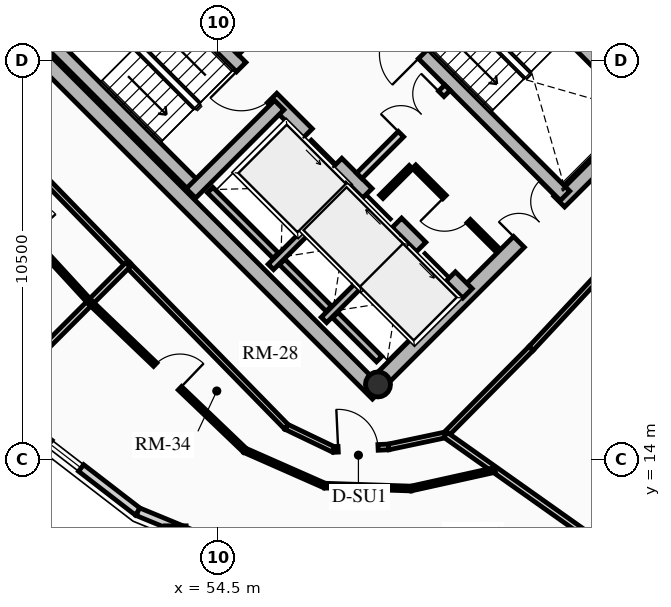
"""IFC4 building model, lengths in metres.
Left out: names, types, materials, properties, quantities, classifications, styles, units other than length and angle.
Written with IfcOpenShell. Run it as: python <this file> out.ifc"""

import sys

from ifc_helpers import new_model, si_unit, direction, frame, frame_2d, origin, origin_2d, place, context, subcontext, project, spatial, rectangle, circle, hollow_circle, extrude, source, transform, mapped, element, fill, save


model = new_model("IFC4")
c1 = context("Model", 3, precision=1e-05, world=origin(), true_north=direction((0.0, 1.0)))
c2 = subcontext(c1, "Body", "Model", "MODEL_VIEW")
j1 = project(units=[si_unit("LENGTHUNIT", "METRE"), si_unit("PLANEANGLEUNIT", "RADIAN")], contexts=[c1])
p1 = place(None, origin())
s1 = spatial("IfcSite", under=j1, at=p1, CompositionType="ELEMENT")
p2 = place(p1, origin())
s2 = spatial("IfcBuilding", under=s1, at=p2, CompositionType="ELEMENT")
p3 = place(p2, frame((0.0, 0.0, 222.85)))
s3 = spatial("IfcBuildingStorey", under=s2, at=p3, CompositionType="ELEMENT", Elevation=222.85)
for number, where, z_axis, x_axis in (
    (1, (58.702, 15.732, 0.0), (0.0, 0.0, 1.0), (-0.707, 0.707, 0.0)),
    (2, (66.268, 23.298, 0.0), (0.0, 0.0, 1.0), (-0.707, 0.707, 0.0)),
):
    element("IfcWall", number, at=place(p3, frame(where, z_axis=z_axis, x_axis=x_axis)), inside=s3, PredefinedType="SHEAR", context=c2, shape_type="SweptSolid", body=[
        extrude(rectangle(XDim=14.1, YDim=0.4, at=frame_2d((7.05, 0.0))), origin(), (0.0, 0.0, 1.0), 3.2),
    ])
p4 = place(p3, frame((58.561, 15.873, 0.0), z_axis=(0.0, 0.0, 1.0), x_axis=(0.707106781187, 0.707106781187, 0.0)))
e3 = element("IfcWall", 3, at=p4, inside=s3, PredefinedType="SHEAR", context=c2, shape_type="SweptSolid", body=[
    extrude(rectangle(XDim=10.7, YDim=0.4, at=frame_2d((5.35, 0.0))), origin(), (0.0, 0.0, 1.0), 3.2),
])
m1 = source(origin(), c2, "Body", "SweptSolid", [
    extrude(rectangle(XDim=1.5, YDim=2.02, at=frame_2d((0.75, 1.01))), frame((0.0, 0.21, 0.0), z_axis=(0.0, -1.0, 0.0), x_axis=(1.0, 0.0, 0.0)), (0.0, 0.0, 1.0), 0.42),
])
p5 = place(p4, frame((5.45, 0.0, 0.0)))
e4 = element("IfcOpeningElement", 4, at=p5, cuts=e3, PredefinedType="OPENING", context=c2, shape_type="MappedRepresentation", body=[
    mapped(m1, transform((0.0, 0.0, 0.0), x_axis=(1.0, 0.0, 0.0), y_axis=(0.0, 1.0, 0.0), z_axis=(0.0, 0.0, 1.0), scale=1.0)),
])
p6 = place(p3, frame((61.06, 18.373, 0.0), z_axis=(0.0, 0.0, 1.0), x_axis=(-0.707106781187, 0.707106781187, 0.0)))
e5 = element("IfcWall", 5, at=p6, inside=s3, PredefinedType="SHEAR", context=c2, shape_type="SweptSolid", body=[
    extrude(rectangle(XDim=13.7, YDim=0.35, at=frame_2d((6.85, 0.0))), origin(), (0.0, 0.0, 1.0), 3.2),
])
m2 = source(origin(), c2, "Body", "SweptSolid", [
    extrude(rectangle(XDim=1.1, YDim=2.015, at=frame_2d((0.55, 1.007))), frame((0.0, 0.185, 0.0), z_axis=(0.0, -1.0, 0.0), x_axis=(1.0, 0.0, 0.0)), (0.0, 0.0, 1.0), 0.37),
])
p7 = place(p6, frame((4.85, 0.0, 0.0)))
e6 = element("IfcOpeningElement", 6, at=p7, cuts=e5, PredefinedType="OPENING", context=c2, shape_type="MappedRepresentation", body=[
    mapped(m2, transform((0.0, 0.0, 0.0), x_axis=(1.0, 0.0, 0.0), y_axis=(0.0, 1.0, 0.0), z_axis=(0.0, 0.0, 1.0), scale=1.0)),
])
p8 = place(p6, frame((0.625, 0.0, 0.0)))
e7 = element("IfcOpeningElement", 7, at=p8, cuts=e5, PredefinedType="OPENING", context=c2, shape_type="MappedRepresentation", body=[
    mapped(m2, transform((0.0, 0.0, 0.0), x_axis=(1.0, 0.0, 0.0), y_axis=(0.0, 1.0, 0.0), z_axis=(0.0, 0.0, 1.0), scale=1.0)),
])
p9 = place(p6, frame((2.625, 0.0, 0.0)))
e8 = element("IfcOpeningElement", 8, at=p9, cuts=e5, PredefinedType="OPENING", context=c2, shape_type="MappedRepresentation", body=[
    mapped(m2, transform((0.0, 0.0, 0.0), x_axis=(1.0, 0.0, 0.0), y_axis=(0.0, 1.0, 0.0), z_axis=(0.0, 0.0, 1.0), scale=1.0)),
])
m3 = source(origin(), c2, "Body", "SweptSolid", [
    extrude(rectangle(XDim=1.15, YDim=2.02, at=frame_2d((0.575, 1.01))), frame((0.0, 0.185, 0.0), z_axis=(0.0, -1.0, 0.0), x_axis=(1.0, 0.0, 0.0)), (0.0, 0.0, 1.0), 0.37),
])
p10 = place(p6, frame((7.27, 0.0, 0.0)))
e9 = element("IfcOpeningElement", 9, at=p10, cuts=e5, PredefinedType="OPENING", context=c2, shape_type="MappedRepresentation", body=[
    mapped(m3, transform((0.0, 0.0, 0.0), x_axis=(1.0, 0.0, 0.0), y_axis=(0.0, 1.0, 0.0), z_axis=(0.0, 0.0, 1.0), scale=1.0)),
])
p11 = place(p3, frame((63.627, 20.94, 0.0), z_axis=(0.0, 0.0, 1.0), x_axis=(-0.707119496762, 0.707094065383, 0.0)))
e10 = element("IfcWall", 10, at=p11, inside=s3, PredefinedType="SHEAR", context=c2, shape_type="SweptSolid", body=[
    extrude(rectangle(XDim=9.6, YDim=0.35, at=frame_2d((4.8, 0.0))), origin(), (0.0, 0.0, 1.0), 3.2),
])
p12 = place(p11, frame((5.28, 0.0, 0.0)))
e11 = element("IfcOpeningElement", 11, at=p12, cuts=e10, PredefinedType="OPENING", context=c2, shape_type="MappedRepresentation", body=[
    mapped(m3, transform((0.0, 0.0, 0.0), x_axis=(1.0, 0.0, 0.0), y_axis=(0.0, 1.0, 0.0), z_axis=(0.0, 0.0, 1.0), scale=1.0)),
])
p13 = place(p3, frame((53.922, 21.141, 0.0), z_axis=(0.0, 0.0, 1.0), x_axis=(-0.707106781187, 0.707106781187, 0.0)))
e12 = element("IfcWall", 12, at=p13, inside=s3, PredefinedType="SHEAR", context=c2, shape_type="SweptSolid", body=[
    extrude(rectangle(XDim=6.695, YDim=0.35, at=frame_2d((3.348, 0.0))), origin(), (0.0, 0.0, 1.0), 3.2),
])
p14 = place(p3, frame((53.784, 21.003, 0.0), z_axis=(0.0, 0.0, 1.0), x_axis=(0.707106781187, 0.707106781187, 0.0)))
e13 = element("IfcWall", 13, at=p14, inside=s3, PredefinedType="SHEAR", context=c2, shape_type="SweptSolid", body=[
    extrude(rectangle(XDim=3.285, YDim=0.35, at=frame_2d((1.643, 0.0))), origin(), (0.0, 0.0, 1.0), 3.2),
])
p15 = place(p3, frame((65.812, 23.125, 0.0), z_axis=(0.0, 0.0, 1.0), x_axis=(-0.707106781187, 0.707106781187, 0.0)))
e14 = element("IfcWall", 14, at=p15, inside=s3, PredefinedType="SHEAR", context=c2, shape_type="SweptSolid", body=[
    extrude(rectangle(XDim=6.695, YDim=0.35, at=frame_2d((3.348, 0.0))), origin(), (0.0, 0.0, 1.0), 3.2),
])
p16 = place(p3, frame((58.706, 15.976, 0.0), z_axis=(0.0, 0.0, 1.0), x_axis=(0.707106781187, 0.707106781187, 0.0)))
e15 = element("IfcColumn", 15, at=p16, inside=s3, PredefinedType="COLUMN", context=c2, shape_type="SweptSolid", body=[
    extrude(hollow_circle(Radius=0.33, WallThickness=0.025, at=origin_2d()), origin(), (0.0, 0.0, 1.0), 3.2),
])
p17 = place(p3, frame((64.827, 11.854, 0.0), z_axis=(0.0, 0.0, 1.0), x_axis=(1.0, 0.0, 0.0)))
e16 = element("IfcColumn", 16, at=p17, inside=s3, PredefinedType="USERDEFINED", context=c2, shape_type="SweptSolid", body=[
    extrude(circle(Radius=0.55, at=origin_2d()), origin(), (0.0, 0.0, 1.0), 3.2),
])
p18 = place(p3, frame((52.387, 12.626, 0.0), z_axis=(0.0, 0.0, 1.0), x_axis=(-0.791998462147, 0.610523083886, 0.0)))
e17 = element("IfcWall", 17, at=p18, inside=s3, PredefinedType="SOLIDWALL", context=c2, shape_type="SweptSolid", body=[
    extrude(rectangle(XDim=4.82, YDim=0.22, at=frame_2d((2.41, 0.0))), origin(), (0.0, 0.0, 1.0), 2.612),
])
m4 = source(origin(), c2, "Body", "SweptSolid", [
    extrude(rectangle(XDim=1.05, YDim=1.3, at=frame_2d((0.525, 0.65))), frame((0.0, 0.12, 0.0), z_axis=(0.0, -1.0, 0.0), x_axis=(1.0, 0.0, 0.0)), (0.0, 0.0, 1.0), 0.24),
])
p19 = place(p18, frame((1.885, 0.0, 0.65)))
e18 = element("IfcOpeningElement", 18, at=p19, cuts=e17, PredefinedType="OPENING", context=c2, shape_type="MappedRepresentation", body=[
    mapped(m4, transform((0.0, 0.0, 0.0), x_axis=(1.0, 0.0, 0.0), y_axis=(0.0, 1.0, 0.0), z_axis=(0.0, 0.0, 1.0), scale=1.0)),
])
p20 = place(p3, frame((56.705, 10.845, 0.0), z_axis=(0.0, 0.0, 1.0), x_axis=(-0.924447353237, 0.381309704956, 0.0)))
e19 = element("IfcWall", 19, at=p20, inside=s3, PredefinedType="SOLIDWALL", context=c2, shape_type="SweptSolid", body=[
    extrude(rectangle(XDim=4.671, YDim=0.22, at=frame_2d((2.335, 0.0))), origin(), (0.0, 0.0, 1.0), 2.612),
])
p21 = place(p3, frame((55.888, 19.069, 0.0), z_axis=(0.0, 0.0, 1.0), x_axis=(0.707106781187, 0.707106781187, 0.0)))
e20 = element("IfcWall", 20, at=p21, inside=s3, PredefinedType="SHEAR", context=c2, shape_type="SweptSolid", body=[
    extrude(rectangle(XDim=2.97, YDim=0.2, at=frame_2d((1.485, 0.0))), origin(), (0.0, 0.0, 1.0), 3.2),
])
p22 = place(p3, frame((56.015, 19.366, 0.0), z_axis=(0.0, 0.0, 1.0), x_axis=(-0.707106781187, 0.707106781187, 0.0)))
e21 = element("IfcWall", 21, at=p22, inside=s3, PredefinedType="SHEAR", context=c2, shape_type="SweptSolid", body=[
    extrude(rectangle(XDim=2.44, YDim=0.2, at=frame_2d((1.22, 0.0))), origin(), (0.0, 0.0, 1.0), 3.2),
])
p23 = place(p3, frame((57.284, 17.673, 0.0), z_axis=(0.0, 0.0, 1.0), x_axis=(0.707147878904, 0.70706568108, 0.0)))
e22 = element("IfcWall", 22, at=p23, inside=s3, PredefinedType="SHEAR", context=c2, shape_type="SweptSolid", body=[
    extrude(rectangle(XDim=2.97, YDim=0.2, at=frame_2d((1.485, 0.0))), origin(), (0.0, 0.0, 1.0), 3.2),
])
p24 = place(p3, frame((57.412, 17.97, 0.0), z_axis=(0.0, 0.0, 1.0), x_axis=(-0.707106781187, 0.707106781187, 0.0)))
e23 = element("IfcWall", 23, at=p24, inside=s3, PredefinedType="SHEAR", context=c2, shape_type="SweptSolid", body=[
    extrude(rectangle(XDim=1.735, YDim=0.2, at=frame_2d((0.867, 0.0))), origin(), (0.0, 0.0, 1.0), 3.2),
])
p25 = place(p3, frame((58.737, 16.644, 0.0), z_axis=(0.0, 0.0, 1.0), x_axis=(-0.707032117043, 0.707181437447, 0.0)))
e24 = element("IfcWall", 24, at=p25, inside=s3, PredefinedType="SHEAR", context=c2, shape_type="SweptSolid", body=[
    extrude(rectangle(XDim=1.635, YDim=0.2, at=frame_2d((0.817, 0.0))), origin(), (0.0, 0.0, 1.0), 3.2),
])
p26 = place(p3, frame((58.214, 21.467, 0.0), z_axis=(0.0, 0.0, 1.0), x_axis=(0.707106781187, 0.707106781187, 0.0)))
e25 = element("IfcWall", 25, at=p26, inside=s3, PredefinedType="PARTITIONING", context=c2, shape_type="SweptSolid", body=[
    extrude(rectangle(XDim=3.28, YDim=0.2, at=frame_2d((1.64, 0.0))), origin(), (0.0, 0.0, 1.0), 2.975),
])
m5 = source(origin(), c2, "Body", "SweptSolid", [
    extrude(rectangle(XDim=1.5, YDim=2.02, at=frame_2d((0.75, 1.01))), frame((0.0, 0.11, 0.0), z_axis=(0.0, -1.0, 0.0), x_axis=(1.0, 0.0, 0.0)), (0.0, 0.0, 1.0), 0.22),
])
p27 = place(p26, frame((1.55, 0.0, 0.0)))
e26 = element("IfcOpeningElement", 26, at=p27, cuts=e25, PredefinedType="OPENING", context=c2, shape_type="MappedRepresentation", body=[
    mapped(m5, transform((0.0, 0.0, 0.0), x_axis=(1.0, 0.0, 0.0), y_axis=(0.0, 1.0, 0.0), z_axis=(0.0, 0.0, 1.0), scale=1.0)),
])
p28 = place(p3, frame((54.961, 24.719, 0.0), z_axis=(0.0, 0.0, 1.0), x_axis=(0.707106781187, 0.707106781187, 0.0)))
e27 = element("IfcWall", 27, at=p28, inside=s3, PredefinedType="PARTITIONING", context=c2, shape_type="SweptSolid", body=[
    extrude(rectangle(XDim=3.28, YDim=0.2, at=frame_2d((1.64, 0.0))), origin(), (0.0, 0.0, 1.0), 2.975),
])
m6 = source(origin(), c2, "Body", "SweptSolid", [
    extrude(rectangle(XDim=0.9, YDim=2.005, at=frame_2d((0.45, 1.002))), frame((0.0, 0.11, 0.0), z_axis=(0.0, -1.0, 0.0), x_axis=(1.0, 0.0, 0.0)), (0.0, 0.0, 1.0), 0.22),
])
p29 = place(p28, frame((0.16, 0.0, 0.0)))
e28 = element("IfcOpeningElement", 28, at=p29, cuts=e27, PredefinedType="OPENING", context=c2, shape_type="MappedRepresentation", body=[
    mapped(m6, transform((0.0, 0.0, 0.0), x_axis=(1.0, 0.0, 0.0), y_axis=(0.0, 1.0, 0.0), z_axis=(0.0, 0.0, 1.0), scale=1.0)),
])
p30 = place(p3, frame((61.835, 19.529, 0.0), z_axis=(0.0, 0.0, 1.0), x_axis=(-0.707146413884, 0.707067146267, 0.0)))
e29 = element("IfcWall", 29, at=p30, inside=s3, PredefinedType="PARTITIONING", context=c2, shape_type="SweptSolid", body=[
    extrude(rectangle(XDim=3.08, YDim=0.125, at=frame_2d((1.54, 0.0))), origin(), (0.0, 0.0, 1.0), 2.975),
])
m7 = source(origin(), c2, "Body", "SweptSolid", [
    extrude(rectangle(XDim=0.9, YDim=2.005, at=frame_2d((0.45, 1.002))), frame((0.0, 0.073, 0.0), z_axis=(0.0, -1.0, 0.0), x_axis=(1.0, 0.0, 0.0)), (0.0, 0.0, 1.0), 0.145),
])
p31 = place(p30, frame((1.05, 0.0, 0.0)))
e30 = element("IfcOpeningElement", 30, at=p31, cuts=e29, PredefinedType="OPENING", context=c2, shape_type="MappedRepresentation", body=[
    mapped(m7, transform((0.0, 0.0, 0.0), x_axis=(1.0, 0.0, 0.0), y_axis=(0.0, 1.0, 0.0), z_axis=(0.0, 0.0, 1.0), scale=1.0)),
])
p32 = place(p3, frame((58.794, 20.915, 0.0), z_axis=(0.0, 0.0, 1.0), x_axis=(0.707106781187, 0.707106781187, 0.0)))
e31 = element("IfcWall", 31, at=p32, inside=s3, PredefinedType="PARTITIONING", context=c2, shape_type="SweptSolid", body=[
    extrude(rectangle(XDim=1.1, YDim=0.125, at=frame_2d((0.55, 0.0))), origin(), (0.0, 0.0, 1.0), 2.975),
])
p33 = place(p3, frame((48.052, 23.323, 0.0), z_axis=(0.0, 0.0, 1.0), x_axis=(0.696573981306, -0.717484974454, 0.0)))
e32 = element("IfcWall", 32, at=p33, inside=s3, PredefinedType="PARTITIONING", context=c2, shape_type="SweptSolid", body=[
    extrude(rectangle(XDim=5.849, YDim=0.15, at=frame_2d((2.925, 0.0))), origin(), (0.0, 0.0, 1.0), 2.975),
])
p34 = place(p3, frame((52.126, 19.126, 0.0), z_axis=(0.0, 0.0, 1.0), x_axis=(0.698979087027, -0.715142108884, 0.0)))
e33 = element("IfcWall", 33, at=p34, inside=s3, PredefinedType="PARTITIONING", context=c2, shape_type="SweptSolid", body=[
    extrude(rectangle(XDim=5.966, YDim=0.15, at=frame_2d((2.983, 0.0))), origin(), (0.0, 0.0, 1.0), 2.612),
])
p35 = place(p3, frame((56.296, 14.859, 0.0), z_axis=(0.0, 0.0, 1.0), x_axis=(0.90178292445, -0.432189260823, 0.0)))
e34 = element("IfcWall", 34, at=p35, inside=s3, PredefinedType="PARTITIONING", context=c2, shape_type="SweptSolid", body=[
    extrude(rectangle(XDim=1.377, YDim=0.15, at=frame_2d((0.688, 0.0))), origin(), (0.0, 0.0, 1.0), 2.545),
])
p36 = place(p3, frame((57.538, 14.264, 0.0), z_axis=(0.0, 0.0, 1.0), x_axis=(0.99892990172, 0.046249880546, 0.0)))
e35 = element("IfcWall", 35, at=p36, inside=s3, PredefinedType="PARTITIONING", context=c2, shape_type="SweptSolid", body=[
    extrude(rectangle(XDim=1.446, YDim=0.15, at=frame_2d((0.723, 0.0))), origin(), (0.0, 0.0, 1.0), 2.612),
])
m8 = source(origin(), c2, "Body", "SweptSolid", [
    extrude(rectangle(XDim=1.05, YDim=2.015, at=frame_2d((0.525, 1.007))), frame((0.0, 0.085, 0.0), z_axis=(0.0, -1.0, 0.0), x_axis=(1.0, 0.0, 0.0)), (0.0, 0.0, 1.0), 0.17),
])
p37 = place(p36, frame((0.12, 0.0, 0.0)))
e36 = element("IfcOpeningElement", 36, at=p37, cuts=e35, PredefinedType="OPENING", context=c2, shape_type="MappedRepresentation", body=[
    mapped(m8, transform((0.0, 0.0, 0.0), x_axis=(1.0, 0.0, 0.0), y_axis=(0.0, 1.0, 0.0), z_axis=(0.0, 0.0, 1.0), scale=1.0)),
])
p38 = place(p3, frame((58.983, 14.331, 0.0), z_axis=(0.0, 0.0, 1.0), x_axis=(0.978328007546, 0.207061125397, 0.0)))
e37 = element("IfcWall", 37, at=p38, inside=s3, PredefinedType="PARTITIONING", context=c2, shape_type="SweptSolid", body=[
    extrude(rectangle(XDim=1.534, YDim=0.15, at=frame_2d((0.767, 0.0))), origin(), (0.0, 0.0, 1.0), 2.545),
])
p39 = place(p3, frame((60.484, 14.648, 0.0), z_axis=(0.0, 0.0, 1.0), x_axis=(0.703398221944, 0.710795991383, 0.0)))
e38 = element("IfcWall", 38, at=p39, inside=s3, PredefinedType="PARTITIONING", context=c2, shape_type="SweptSolid", body=[
    extrude(rectangle(XDim=3.201, YDim=0.15, at=frame_2d((1.601, 0.0))), origin(), (0.0, 0.0, 1.0), 2.612),
])
p40 = place(p3, frame((62.736, 16.924, 0.0), z_axis=(0.0, 0.0, 1.0), x_axis=(0.681946700833, 0.731401871219, 0.0)))
e39 = element("IfcWall", 39, at=p40, inside=s3, PredefinedType="PARTITIONING", context=c2, shape_type="SweptSolid", body=[
    extrude(rectangle(XDim=6.393, YDim=0.15, at=frame_2d((3.196, 0.0))), origin(), (0.0, 0.0, 1.0), 2.545),
])
p41 = place(p3, frame((52.126, 19.126, 0.0), z_axis=(0.0, 0.0, 1.0), x_axis=(-0.707106781187, -0.707106781187, 0.0)))
e40 = element("IfcWall", 40, at=p41, inside=s3, PredefinedType="PARTITIONING", context=c2, shape_type="SweptSolid", body=[
    extrude(rectangle(XDim=5.01, YDim=0.16, at=frame_2d((2.505, 0.0))), origin(), (0.0, 0.0, 1.0), 2.612),
])
p42 = place(p3, frame((60.484, 14.648, 0.0), z_axis=(0.0, 0.0, 1.0), x_axis=(0.81605983932, -0.577967420058, 0.0)))
e41 = element("IfcWall", 41, at=p42, inside=s3, PredefinedType="PARTITIONING", context=c2, shape_type="SweptSolid", body=[
    extrude(rectangle(XDim=5.699, YDim=0.16, at=frame_2d((2.85, 0.0))), origin(), (0.0, 0.0, 1.0), 2.612),
])
p43 = place(p3, frame((47.377, 22.223, 0.0), z_axis=(0.0, 0.0, 1.0), x_axis=(0.676554417653, -0.736392639802, 0.0)))
e42 = element("IfcWall", 42, at=p43, inside=s3, PredefinedType="PARTITIONING", context=c2, shape_type="SweptSolid", body=[
    extrude(rectangle(XDim=5.553, YDim=0.125, at=frame_2d((2.776, 0.0))), origin(), (0.0, 0.0, 1.0), 2.975),
])
p44 = place(p43, frame((2.326, 0.0, 0.0)))
e43 = element("IfcOpeningElement", 43, at=p44, cuts=e42, PredefinedType="OPENING", context=c2, shape_type="MappedRepresentation", body=[
    mapped(m7, transform((0.0, 0.0, 0.0), x_axis=(1.0, 0.0, 0.0), y_axis=(0.0, 1.0, 0.0), z_axis=(0.0, 0.0, 1.0), scale=1.0)),
])
p45 = place(p3, frame((51.134, 18.134, 0.0), z_axis=(0.0, 0.0, 1.0), x_axis=(0.722450775654, -0.691422357721, 0.0)))
e44 = element("IfcWall", 44, at=p45, inside=s3, PredefinedType="PARTITIONING", context=c2, shape_type="SweptSolid", body=[
    extrude(rectangle(XDim=5.634, YDim=0.125, at=frame_2d((2.817, 0.0))), origin(), (0.0, 0.0, 1.0), 2.612),
])
p46 = place(p45, frame((2.367, 0.0, 0.0)))
e45 = element("IfcOpeningElement", 45, at=p46, cuts=e44, PredefinedType="OPENING", context=c2, shape_type="MappedRepresentation", body=[
    mapped(m7, transform((0.0, 0.0, 0.0), x_axis=(1.0, 0.0, 0.0), y_axis=(0.0, 1.0, 0.0), z_axis=(0.0, 0.0, 1.0), scale=1.0)),
])
p47 = place(p3, frame((55.204, 14.239, 0.0), z_axis=(0.0, 0.0, 1.0), x_axis=(0.914999746908, -0.403454412738, 0.0)))
e46 = element("IfcWall", 46, at=p47, inside=s3, PredefinedType="PARTITIONING", context=c2, shape_type="SweptSolid", body=[
    extrude(rectangle(XDim=2.297, YDim=0.125, at=frame_2d((1.148, 0.0))), origin(), (0.0, 0.0, 1.0), 2.545),
])
p48 = place(p3, frame((57.306, 13.312, 0.0), z_axis=(0.0, 0.0, 1.0), x_axis=(0.999437122872, -0.033547539789, 0.0)))
e47 = element("IfcWall", 47, at=p48, inside=s3, PredefinedType="PARTITIONING", context=c2, shape_type="SweptSolid", body=[
    extrude(rectangle(XDim=2.271, YDim=0.125, at=frame_2d((1.135, 0.0))), origin(), (0.0, 0.0, 1.0), 2.612),
])
p49 = place(p3, frame((59.575, 13.236, 0.0), z_axis=(0.0, 0.0, 1.0), x_axis=(0.97628336492, 0.216496631337, 0.0)))
e48 = element("IfcWall", 48, at=p49, inside=s3, PredefinedType="PARTITIONING", context=c2, shape_type="SweptSolid", body=[
    extrude(rectangle(XDim=2.264, YDim=0.125, at=frame_2d((1.132, 0.0))), origin(), (0.0, 0.0, 1.0), 2.545),
])
m9 = source(origin(), c2, "Body", "SweptSolid", [
    extrude(rectangle(XDim=1.05, YDim=1.3, at=frame_2d((0.525, 0.65))), frame((0.0, 0.03, 0.0), z_axis=(0.0, -1.0, 0.0), x_axis=(1.0, 0.0, 0.0)), (0.0, 0.0, 1.0), 0.06),
])
p50 = place(p19, origin())
e49 = element("IfcWindow", 49, at=p50, inside=s3, PartitioningType="SINGLE_PANEL", PredefinedType="WINDOW", context=c2, shape_type="MappedRepresentation", body=[
    mapped(m9, transform((0.0, 0.0, 0.0), x_axis=(1.0, 0.0, 0.0), y_axis=(0.0, 1.0, 0.0), z_axis=(0.0, 0.0, 1.0), scale=1.0)),
])
fill(e18, e49)
m10 = source(origin(), c2, "Body", "SweptSolid", [
    extrude(rectangle(XDim=1.1, YDim=2.015, at=frame_2d((0.55, 1.007))), frame((0.0, 0.025, 0.0), z_axis=(0.0, -1.0, 0.0), x_axis=(1.0, 0.0, 0.0)), (0.0, 0.0, 1.0), 0.05),
])
p51 = place(p7, origin())
e50 = element("IfcDoor", 50, at=p51, inside=s3, OperationType="SLIDING_TO_LEFT", PredefinedType="DOOR", context=c2, shape_type="MappedRepresentation", body=[
    mapped(m10, transform((0.0, 0.0, 0.0), x_axis=(1.0, 0.0, 0.0), y_axis=(0.0, 1.0, 0.0), z_axis=(0.0, 0.0, 1.0), scale=1.0)),
])
fill(e6, e50)
p52 = place(p8, origin())
e51 = element("IfcDoor", 51, at=p52, inside=s3, OperationType="SLIDING_TO_LEFT", PredefinedType="DOOR", context=c2, shape_type="MappedRepresentation", body=[
    mapped(m10, transform((0.0, 0.0, 0.0), x_axis=(1.0, 0.0, 0.0), y_axis=(0.0, 1.0, 0.0), z_axis=(0.0, 0.0, 1.0), scale=1.0)),
])
fill(e7, e51)
p53 = place(p9, origin())
e52 = element("IfcDoor", 52, at=p53, inside=s3, OperationType="SLIDING_TO_RIGHT", PredefinedType="DOOR", context=c2, shape_type="MappedRepresentation", body=[
    mapped(m10, transform((0.0, 0.0, 0.0), x_axis=(1.0, 0.0, 0.0), y_axis=(0.0, 1.0, 0.0), z_axis=(0.0, 0.0, 1.0), scale=1.0)),
])
fill(e8, e52)
m11 = source(origin(), c2, "Body", "SweptSolid", [
    extrude(rectangle(XDim=1.15, YDim=2.02, at=frame_2d((0.575, 1.01))), frame((0.0, 0.025, 0.0), z_axis=(0.0, -1.0, 0.0), x_axis=(1.0, 0.0, 0.0)), (0.0, 0.0, 1.0), 0.05),
])
p54 = place(p10, origin())
e53 = element("IfcDoor", 53, at=p54, inside=s3, OperationType="SINGLE_SWING_RIGHT", PredefinedType="DOOR", context=c2, shape_type="MappedRepresentation", body=[
    mapped(m11, transform((0.0, 0.0, 0.0), x_axis=(1.0, 0.0, 0.0), y_axis=(0.0, 1.0, 0.0), z_axis=(0.0, 0.0, 1.0), scale=1.0)),
])
fill(e9, e53)
p55 = place(p12, origin())
e54 = element("IfcDoor", 54, at=p55, inside=s3, OperationType="SINGLE_SWING_LEFT", PredefinedType="DOOR", context=c2, shape_type="MappedRepresentation", body=[
    mapped(m11, transform((0.0, 0.0, 0.0), x_axis=(1.0, 0.0, 0.0), y_axis=(0.0, 1.0, 0.0), z_axis=(0.0, 0.0, 1.0), scale=1.0)),
])
fill(e11, e54)
m12 = source(origin(), c2, "Body", "SweptSolid", [
    extrude(rectangle(XDim=1.5, YDim=2.02, at=frame_2d((0.75, 1.01))), frame((0.0, 0.025, 0.0), z_axis=(0.0, -1.0, 0.0), x_axis=(1.0, 0.0, 0.0)), (0.0, 0.0, 1.0), 0.05),
])
p56 = place(p5, origin())
e55 = element("IfcDoor", 55, at=p56, inside=s3, OperationType="DOUBLE_DOOR_SINGLE_SWING", PredefinedType="DOOR", context=c2, shape_type="MappedRepresentation", body=[
    mapped(m12, transform((0.0, 0.0, 0.0), x_axis=(1.0, 0.0, 0.0), y_axis=(0.0, 1.0, 0.0), z_axis=(0.0, 0.0, 1.0), scale=1.0)),
])
fill(e4, e55)
p57 = place(p27, origin())
e56 = element("IfcDoor", 56, at=p57, inside=s3, OperationType="DOUBLE_DOOR_SINGLE_SWING", PredefinedType="DOOR", context=c2, shape_type="MappedRepresentation", body=[
    mapped(m12, transform((0.0, 0.0, 0.0), x_axis=(1.0, 0.0, 0.0), y_axis=(0.0, 1.0, 0.0), z_axis=(0.0, 0.0, 1.0), scale=1.0)),
])
fill(e26, e56)
m13 = source(origin(), c2, "Body", "SweptSolid", [
    extrude(rectangle(XDim=0.9, YDim=2.005, at=frame_2d((0.45, 1.002))), frame((0.0, 0.025, 0.0), z_axis=(0.0, -1.0, 0.0), x_axis=(1.0, 0.0, 0.0)), (0.0, 0.0, 1.0), 0.05),
])
p58 = place(p31, origin())
e57 = element("IfcDoor", 57, at=p58, inside=s3, OperationType="SINGLE_SWING_RIGHT", PredefinedType="DOOR", context=c2, shape_type="MappedRepresentation", body=[
    mapped(m13, transform((0.0, 0.0, 0.0), x_axis=(1.0, 0.0, 0.0), y_axis=(0.0, 1.0, 0.0), z_axis=(0.0, 0.0, 1.0), scale=1.0)),
])
fill(e30, e57)
m14 = source(origin(), c2, "Body", "SweptSolid", [
    extrude(rectangle(XDim=1.05, YDim=2.015, at=frame_2d((0.525, 1.007))), frame((0.0, 0.025, 0.0), z_axis=(0.0, -1.0, 0.0), x_axis=(1.0, 0.0, 0.0)), (0.0, 0.0, 1.0), 0.05),
])
p59 = place(p37, origin())
e58 = element("IfcDoor", 58, at=p59, inside=s3, OperationType="SINGLE_SWING_LEFT", PredefinedType="DOOR", context=c2, shape_type="MappedRepresentation", body=[
    mapped(m14, transform((0.0, 0.0, 0.0), x_axis=(1.0, 0.0, 0.0), y_axis=(0.0, 1.0, 0.0), z_axis=(0.0, 0.0, 1.0), scale=1.0)),
])
fill(e36, e58)
p60 = place(p46, origin())
e59 = element("IfcDoor", 59, at=p60, inside=s3, OperationType="SINGLE_SWING_RIGHT", PredefinedType="DOOR", context=c2, shape_type="MappedRepresentation", body=[
    mapped(m13, transform((0.0, 0.0, 0.0), x_axis=(1.0, 0.0, 0.0), y_axis=(0.0, 1.0, 0.0), z_axis=(0.0, 0.0, 1.0), scale=1.0)),
])
fill(e45, e59)
save(model, sys.argv[1])
